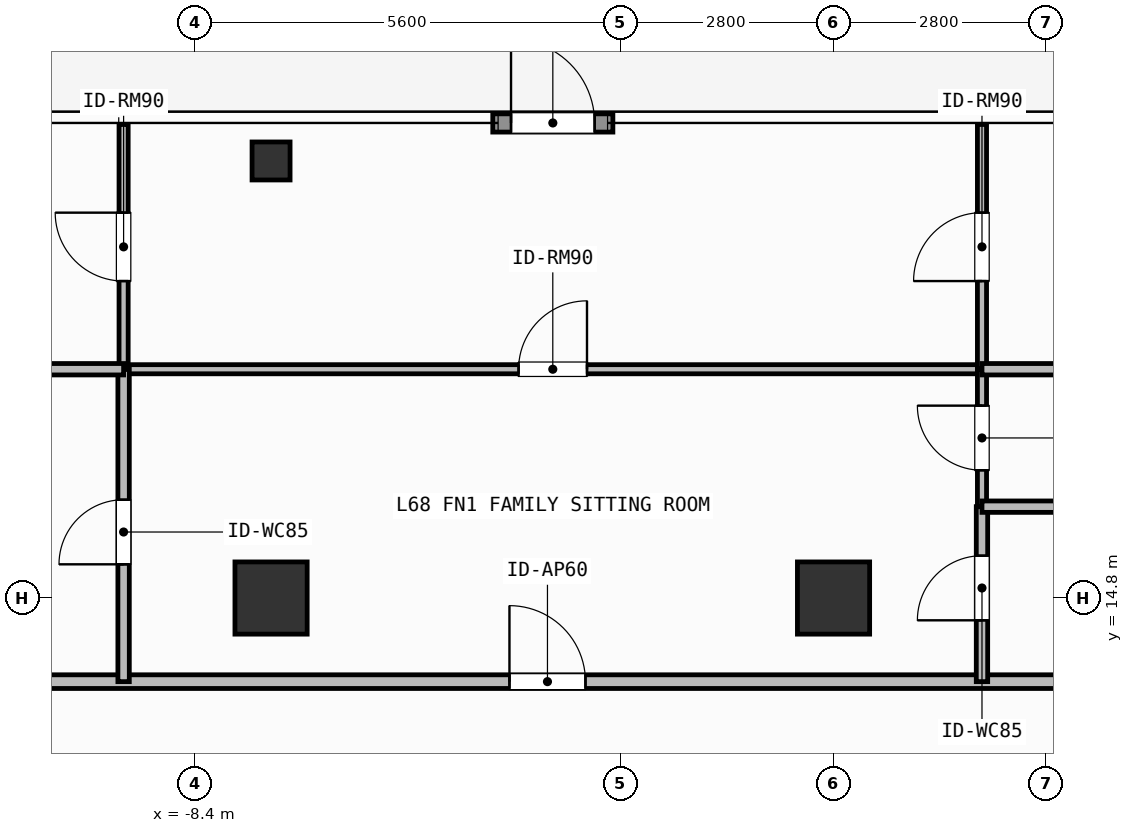
"""IFC4 building model, lengths in metres.
Left out: names, types, materials, properties, quantities, classifications, styles, units other than length and angle.
Written with IfcOpenShell. Run it as: python <this file> out.ifc"""

import sys

from ifc_helpers import new_model, si_unit, direction, frame, frame_2d, origin, origin_2d, place, context, subcontext, project, spatial, rectangle, hollow_rectangle, extrude, element, fill, save


model = new_model("IFC4")
c1 = context("Model", 3, precision=1e-05, world=origin(), true_north=direction((0.0, 1.0)))
c2 = subcontext(c1, "Body", "Model", "MODEL_VIEW")
j1 = project(units=[si_unit("LENGTHUNIT", "METRE"), si_unit("PLANEANGLEUNIT", "RADIAN")], contexts=[c1])
p1 = place(None, origin())
s1 = spatial("IfcSite", under=j1, at=p1, CompositionType="ELEMENT")
p2 = place(p1, origin())
s2 = spatial("IfcBuilding", under=s1, at=p2, CompositionType="ELEMENT")
p3 = place(p2, frame((0.0, 0.0, 278.1)))
s3 = spatial("IfcBuildingStorey", under=s2, at=p3, CompositionType="ELEMENT", Elevation=278.1)
for number, where, z_axis, x_axis in (
    (1, (-7.4, 14.8, 0.0), (0.0, 0.0, 1.0), (1.0, 0.0, 0.0)),
    (2, (0.0, 14.8, 0.0), (0.0, 0.0, 1.0), (1.0, 0.0, 0.0)),
):
    element("IfcColumn", number, at=place(p3, frame(where, z_axis=z_axis, x_axis=x_axis)), inside=s3, PredefinedType="COLUMN", context=c2, shape_type="SweptSolid", body=[
        extrude(rectangle(XDim=0.95, YDim=0.95, at=origin_2d()), origin(), (0.0, 0.0, 1.0), 3.9),
    ])
p4 = place(p3, frame((-7.4, 20.55, 0.0), z_axis=(0.0, 0.0, 1.0), x_axis=(1.0, 0.0, 0.0)))
e3 = element("IfcColumn", 3, at=p4, inside=s3, PredefinedType="COLUMN", context=c2, shape_type="SweptSolid", body=[
    extrude(hollow_rectangle(XDim=0.5, YDim=0.5, WallThickness=0.025, at=origin_2d()), origin(), (0.0, 0.0, 1.0), 3.9),
])
p5 = place(p3, frame((-4.483, 21.05, 0.0), z_axis=(0.0, 0.0, 1.0), x_axis=(1.0, 0.0, 0.0)))
e4 = element("IfcWall", 4, at=p5, inside=s3, PredefinedType="SOLIDWALL", context=c2, shape_type="SweptSolid", body=[
    extrude(rectangle(XDim=1.58, YDim=0.24, at=frame_2d((0.79, 0.0))), origin(), (0.0, 0.0, 1.0), 3.68),
])
p6 = place(p5, frame((0.24, 0.0, 0.0)))
e5 = element("IfcOpeningElement", 5, at=p6, cuts=e4, PredefinedType="OPENING", context=c2, shape_type="SweptSolid", body=[
    extrude(rectangle(XDim=1.1, YDim=2.2, at=frame_2d((0.55, 1.1))), frame((0.0, 0.13, 0.0), z_axis=(0.0, -1.0, 0.0), x_axis=(1.0, 0.0, 0.0)), (0.0, 0.0, 1.0), 0.26),
])
p7 = place(p3, frame((-13.72, 13.7, 0.0), z_axis=(0.0, 0.0, 1.0), x_axis=(1.0, 0.0, 0.0)))
e6 = element("IfcWall", 6, at=p7, inside=s3, PredefinedType="PARTITIONING", context=c2, shape_type="SweptSolid", body=[
    extrude(rectangle(XDim=19.734, YDim=0.18, at=frame_2d((9.867, 0.0))), origin(), (0.0, 0.0, 1.0), 3.68),
])
p8 = place(p7, frame((9.456, 0.0, 0.0)))
e7 = element("IfcOpeningElement", 7, at=p8, cuts=e6, PredefinedType="OPENING", context=c2, shape_type="SweptSolid", body=[
    extrude(rectangle(XDim=1.0, YDim=2.2, at=frame_2d((0.5, 1.1))), frame((0.0, 0.1, 0.0), z_axis=(0.0, -1.0, 0.0), x_axis=(1.0, 0.0, 0.0)), (0.0, 0.0, 1.0), 0.2),
])
p9 = place(p3, frame((-9.34, 17.81, 0.0), z_axis=(0.0, 0.0, 1.0), x_axis=(1.0, 0.0, 0.0)))
e8 = element("IfcWall", 8, at=p9, inside=s3, PredefinedType="PARTITIONING", context=c2, shape_type="SweptSolid", body=[
    extrude(rectangle(XDim=11.293, YDim=0.12, at=frame_2d((5.646, 0.0))), origin(), (0.0, 0.0, 1.0), 3.68),
])
p10 = place(p9, frame((5.197, 0.0, 0.0)))
e9 = element("IfcOpeningElement", 9, at=p10, cuts=e8, PredefinedType="OPENING", context=c2, shape_type="SweptSolid", body=[
    extrude(rectangle(XDim=0.9, YDim=2.1, at=frame_2d((0.45, 1.05))), frame((0.0, 0.07, 0.0), z_axis=(0.0, -1.0, 0.0), x_axis=(1.0, 0.0, 0.0)), (0.0, 0.0, 1.0), 0.14),
])
p11 = place(p3, frame((-9.34, 13.7, 0.0), z_axis=(0.0, 0.0, 1.0), x_axis=(0.0, 1.0, 0.0)))
e10 = element("IfcWall", 10, at=p11, inside=s3, PredefinedType="PARTITIONING", context=c2, shape_type="SweptSolid", body=[
    extrude(rectangle(XDim=4.11, YDim=0.15, at=frame_2d((2.055, 0.0))), origin(), (0.0, 0.0, 1.0), 3.68),
])
p12 = place(p11, frame((1.543, 0.0, 0.0)))
e11 = element("IfcOpeningElement", 11, at=p12, cuts=e10, PredefinedType="OPENING", context=c2, shape_type="SweptSolid", body=[
    extrude(rectangle(XDim=0.85, YDim=2.1, at=frame_2d((0.425, 1.05))), frame((0.0, 0.085, 0.0), z_axis=(0.0, -1.0, 0.0), x_axis=(1.0, 0.0, 0.0)), (0.0, 0.0, 1.0), 0.17),
])
p13 = place(p3, frame((-9.34, 17.81, 0.0), z_axis=(0.0, 0.0, 1.0), x_axis=(0.0, 1.0, 0.0)))
e12 = element("IfcWall", 12, at=p13, inside=s3, PredefinedType="PARTITIONING", context=c2, shape_type="SweptSolid", body=[
    extrude(rectangle(XDim=3.22, YDim=0.12, at=frame_2d((1.61, 0.0))), origin(), (0.0, 0.0, 1.0), 3.68),
])
p14 = place(p13, frame((1.16, 0.0, 0.0)))
e13 = element("IfcOpeningElement", 13, at=p14, cuts=e12, PredefinedType="OPENING", context=c2, shape_type="SweptSolid", body=[
    extrude(rectangle(XDim=0.9, YDim=2.1, at=frame_2d((0.45, 1.05))), frame((0.0, 0.07, 0.0), z_axis=(0.0, -1.0, 0.0), x_axis=(1.0, 0.0, 0.0)), (0.0, 0.0, 1.0), 0.14),
])
p15 = place(p3, frame((1.953, 13.7, 0.0), z_axis=(0.0, 0.0, 1.0), x_axis=(0.0, 1.0, 0.0)))
e14 = element("IfcWall", 14, at=p15, inside=s3, PredefinedType="PARTITIONING", context=c2, shape_type="SweptSolid", body=[
    extrude(rectangle(XDim=2.302, YDim=0.15, at=frame_2d((1.151, 0.0))), origin(), (0.0, 0.0, 1.0), 3.68),
])
p16 = place(p15, frame((0.807, 0.0, 0.0)))
e15 = element("IfcOpeningElement", 15, at=p16, cuts=e14, PredefinedType="OPENING", context=c2, shape_type="SweptSolid", body=[
    extrude(rectangle(XDim=0.85, YDim=2.1, at=frame_2d((0.425, 1.05))), frame((0.0, 0.085, 0.0), z_axis=(0.0, -1.0, 0.0), x_axis=(1.0, 0.0, 0.0)), (0.0, 0.0, 1.0), 0.17),
])
p17 = place(p3, frame((1.953, 16.002, 0.0), z_axis=(0.0, 0.0, 1.0), x_axis=(0.0, 1.0, 0.0)))
e16 = element("IfcWall", 16, at=p17, inside=s3, PredefinedType="PARTITIONING", context=c2, shape_type="SweptSolid", body=[
    extrude(rectangle(XDim=1.808, YDim=0.12, at=frame_2d((0.904, 0.0))), origin(), (0.0, 0.0, 1.0), 3.68),
])
p18 = place(p17, frame((0.479, 0.0, 0.0)))
e17 = element("IfcOpeningElement", 17, at=p18, cuts=e16, PredefinedType="OPENING", context=c2, shape_type="SweptSolid", body=[
    extrude(rectangle(XDim=0.85, YDim=2.1, at=frame_2d((0.425, 1.05))), frame((0.0, 0.07, 0.0), z_axis=(0.0, -1.0, 0.0), x_axis=(1.0, 0.0, 0.0)), (0.0, 0.0, 1.0), 0.14),
])
p19 = place(p3, frame((1.953, 17.81, 0.0), z_axis=(0.0, 0.0, 1.0), x_axis=(0.0, 1.0, 0.0)))
e18 = element("IfcWall", 18, at=p19, inside=s3, PredefinedType="PARTITIONING", context=c2, shape_type="SweptSolid", body=[
    extrude(rectangle(XDim=3.22, YDim=0.12, at=frame_2d((1.61, 0.0))), origin(), (0.0, 0.0, 1.0), 3.68),
])
p20 = place(p19, frame((1.16, 0.0, 0.0)))
e19 = element("IfcOpeningElement", 19, at=p20, cuts=e18, PredefinedType="OPENING", context=c2, shape_type="SweptSolid", body=[
    extrude(rectangle(XDim=0.9, YDim=2.1, at=frame_2d((0.45, 1.05))), frame((0.0, 0.07, 0.0), z_axis=(0.0, -1.0, 0.0), x_axis=(1.0, 0.0, 0.0)), (0.0, 0.0, 1.0), 0.14),
])
p21 = place(p3, frame((-13.72, 17.81, 0.0), z_axis=(0.0, 0.0, 1.0), x_axis=(1.0, 0.0, 0.0)))
e20 = element("IfcWall", 20, at=p21, inside=s3, PredefinedType="PARTITIONING", context=c2, shape_type="SweptSolid", body=[
    extrude(rectangle(XDim=4.38, YDim=0.15, at=frame_2d((2.19, 0.0))), origin(), (0.0, 0.0, 1.0), 3.68),
])
for number, where, z_axis, x_axis in (
    (21, (1.953, 16.002, 0.0), (0.0, 0.0, 1.0), (1.0, 0.0, 0.0)),
    (22, (1.953, 17.81, 0.0), (0.0, 0.0, 1.0), (1.0, 0.0, 0.0)),
):
    element("IfcWall", number, at=place(p3, frame(where, z_axis=z_axis, x_axis=x_axis)), inside=s3, PredefinedType="PARTITIONING", context=c2, shape_type="SweptSolid", body=[
        extrude(rectangle(XDim=4.061, YDim=0.15, at=frame_2d((2.031, 0.0))), origin(), (0.0, 0.0, 1.0), 3.68),
    ])
p22 = place(p6, origin())
e23 = element("IfcDoor", 23, at=p22, inside=s3, OperationType="SINGLE_SWING_LEFT", PredefinedType="DOOR", context=c2, shape_type="SweptSolid", body=[
    extrude(rectangle(XDim=1.1, YDim=2.2, at=frame_2d((0.55, 1.1))), frame((0.0, 0.025, 0.0), z_axis=(0.0, -1.0, 0.0), x_axis=(1.0, 0.0, 0.0)), (0.0, 0.0, 1.0), 0.05),
])
fill(e5, e23)
p23 = place(p8, origin())
e24 = element("IfcDoor", 24, at=p23, inside=s3, OperationType="SINGLE_SWING_LEFT", PredefinedType="DOOR", context=c2, shape_type="SweptSolid", body=[
    extrude(rectangle(XDim=1.0, YDim=2.2, at=frame_2d((0.5, 1.1))), frame((0.0, 0.025, 0.0), z_axis=(0.0, -1.0, 0.0), x_axis=(1.0, 0.0, 0.0)), (0.0, 0.0, 1.0), 0.05),
])
fill(e7, e24)
p24 = place(p10, origin())
e25 = element("IfcDoor", 25, at=p24, inside=s3, OperationType="SINGLE_SWING_RIGHT", PredefinedType="DOOR", context=c2, shape_type="SweptSolid", body=[
    extrude(rectangle(XDim=0.9, YDim=2.1, at=frame_2d((0.45, 1.05))), frame((0.0, 0.025, 0.0), z_axis=(0.0, -1.0, 0.0), x_axis=(1.0, 0.0, 0.0)), (0.0, 0.0, 1.0), 0.05),
])
fill(e9, e25)
p25 = place(p12, origin())
e26 = element("IfcDoor", 26, at=p25, inside=s3, OperationType="SINGLE_SWING_LEFT", PredefinedType="DOOR", context=c2, shape_type="SweptSolid", body=[
    extrude(rectangle(XDim=0.85, YDim=2.1, at=frame_2d((0.425, 1.05))), frame((0.0, 0.025, 0.0), z_axis=(0.0, -1.0, 0.0), x_axis=(1.0, 0.0, 0.0)), (0.0, 0.0, 1.0), 0.05),
])
fill(e11, e26)
p26 = place(p14, origin())
e27 = element("IfcDoor", 27, at=p26, inside=s3, OperationType="SINGLE_SWING_RIGHT", PredefinedType="DOOR", context=c2, shape_type="SweptSolid", body=[
    extrude(rectangle(XDim=0.9, YDim=2.1, at=frame_2d((0.45, 1.05))), frame((0.0, 0.025, 0.0), z_axis=(0.0, -1.0, 0.0), x_axis=(1.0, 0.0, 0.0)), (0.0, 0.0, 1.0), 0.05),
])
fill(e13, e27)
p27 = place(p16, origin())
e28 = element("IfcDoor", 28, at=p27, inside=s3, OperationType="SINGLE_SWING_LEFT", PredefinedType="DOOR", context=c2, shape_type="SweptSolid", body=[
    extrude(rectangle(XDim=0.85, YDim=2.1, at=frame_2d((0.425, 1.05))), frame((0.0, 0.025, 0.0), z_axis=(0.0, -1.0, 0.0), x_axis=(1.0, 0.0, 0.0)), (0.0, 0.0, 1.0), 0.05),
])
fill(e15, e28)
p28 = place(p18, origin())
e29 = element("IfcDoor", 29, at=p28, inside=s3, OperationType="SINGLE_SWING_RIGHT", PredefinedType="DOOR", context=c2, shape_type="SweptSolid", body=[
    extrude(rectangle(XDim=0.85, YDim=2.1, at=frame_2d((0.425, 1.05))), frame((0.0, 0.025, 0.0), z_axis=(0.0, -1.0, 0.0), x_axis=(1.0, 0.0, 0.0)), (0.0, 0.0, 1.0), 0.05),
])
fill(e17, e29)
p29 = place(p20, origin())
e30 = element("IfcDoor", 30, at=p29, inside=s3, OperationType="SINGLE_SWING_LEFT", PredefinedType="DOOR", context=c2, shape_type="SweptSolid", body=[
    extrude(rectangle(XDim=0.9, YDim=2.1, at=frame_2d((0.45, 1.05))), frame((0.0, 0.025, 0.0), z_axis=(0.0, -1.0, 0.0), x_axis=(1.0, 0.0, 0.0)), (0.0, 0.0, 1.0), 0.05),
])
fill(e19, e30)
save(model, sys.argv[1])
